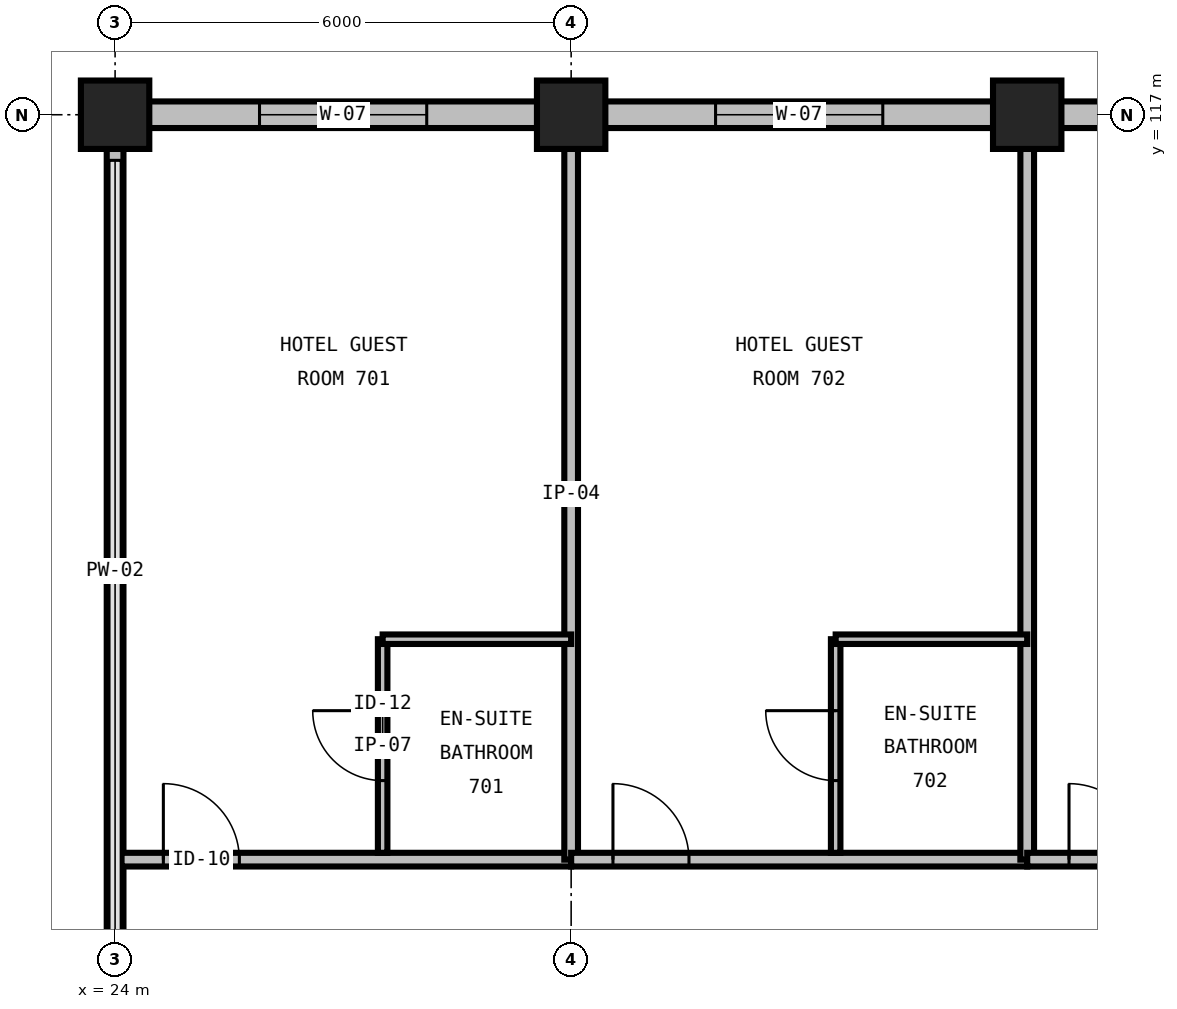
"""IFC4 building model, lengths in metres.
Left out: names, types, materials, properties, quantities, classifications, styles, units other than length and angle.
Written with IfcOpenShell. Run it as: python <this file> out.ifc"""

import sys

from ifc_helpers import new_model, si_unit, direction, frame, frame_2d, origin, origin_2d, place, context, subcontext, project, spatial, rectangle, extrude, element, fill, save


model = new_model("IFC4")
c1 = context("Model", 3, precision=1e-05, world=origin(), true_north=direction((0.0, 1.0)))
c2 = subcontext(c1, "Body", "Model", "MODEL_VIEW")
j1 = project(units=[si_unit("LENGTHUNIT", "METRE"), si_unit("PLANEANGLEUNIT", "RADIAN")], contexts=[c1])
p1 = place(None, origin())
s1 = spatial("IfcSite", under=j1, at=p1, CompositionType="ELEMENT")
p2 = place(p1, origin())
s2 = spatial("IfcBuilding", under=s1, at=p2, CompositionType="ELEMENT")
p3 = place(p2, frame((0.0, 0.0, 34.8)))
s3 = spatial("IfcBuildingStorey", under=s2, at=p3, CompositionType="ELEMENT", Elevation=34.8)
for number, where, z_axis, x_axis in (
    (1, (24.0, 117.0, 0.0), (0.0, 0.0, 1.0), (1.0, 0.0, 0.0)),
    (2, (30.0, 117.0, 0.0), (0.0, 0.0, 1.0), (1.0, 0.0, 0.0)),
    (3, (36.0, 117.0, 0.0), (0.0, 0.0, 1.0), (1.0, 0.0, 0.0)),
):
    element("IfcColumn", number, at=place(p3, frame(where, z_axis=z_axis, x_axis=x_axis)), inside=s3, PredefinedType="COLUMN", context=c2, shape_type="SweptSolid", body=[
        extrude(rectangle(XDim=0.9, YDim=0.9, at=origin_2d()), origin(), (0.0, 0.0, 1.0), 3.6),
    ])
p4 = place(p3, frame((30.0, 117.0, 0.0), z_axis=(0.0, 0.0, 1.0), x_axis=(-1.0, 0.0, 0.0)))
e4 = element("IfcWall", 4, at=p4, inside=s3, PredefinedType="STANDARD", context=c2, shape_type="SweptSolid", body=[
    extrude(rectangle(XDim=6.0, YDim=0.35, at=frame_2d((3.0, 0.0))), origin(), (0.0, 0.0, 1.0), 2.486),
])
p5 = place(p4, frame((1.9, 0.0, 0.75)))
e5 = element("IfcOpeningElement", 5, at=p5, cuts=e4, PredefinedType="OPENING", context=c2, shape_type="SweptSolid", body=[
    extrude(rectangle(XDim=2.2, YDim=1.6, at=frame_2d((1.1, 0.8))), frame((0.0, 0.19, 0.0), z_axis=(0.0, -1.0, 0.0), x_axis=(1.0, 0.0, 0.0)), (0.0, 0.0, 1.0), 0.38),
])
p6 = place(p3, frame((36.0, 117.0, 0.0), z_axis=(0.0, 0.0, 1.0), x_axis=(-1.0, 0.0, 0.0)))
e6 = element("IfcWall", 6, at=p6, inside=s3, PredefinedType="STANDARD", context=c2, shape_type="SweptSolid", body=[
    extrude(rectangle(XDim=6.0, YDim=0.35, at=frame_2d((3.0, 0.0))), origin(), (0.0, 0.0, 1.0), 2.486),
])
p7 = place(p6, frame((1.9, 0.0, 0.75)))
e7 = element("IfcOpeningElement", 7, at=p7, cuts=e6, PredefinedType="OPENING", context=c2, shape_type="SweptSolid", body=[
    extrude(rectangle(XDim=2.2, YDim=1.6, at=frame_2d((1.1, 0.8))), frame((0.0, 0.19, 0.0), z_axis=(0.0, -1.0, 0.0), x_axis=(1.0, 0.0, 0.0)), (0.0, 0.0, 1.0), 0.38),
])
p8 = place(p3, frame((42.0, 117.0, 0.0), z_axis=(0.0, 0.0, 1.0), x_axis=(-1.0, 0.0, 0.0)))
e8 = element("IfcWall", 8, at=p8, inside=s3, PredefinedType="STANDARD", context=c2, shape_type="SweptSolid", body=[
    extrude(rectangle(XDim=6.0, YDim=0.35, at=frame_2d((3.0, 0.0))), origin(), (0.0, 0.0, 1.0), 2.486),
])
p9 = place(p8, frame((1.9, 0.0, 0.75)))
e9 = element("IfcOpeningElement", 9, at=p9, cuts=e8, PredefinedType="OPENING", context=c2, shape_type="SweptSolid", body=[
    extrude(rectangle(XDim=2.2, YDim=1.6, at=frame_2d((1.1, 0.8))), frame((0.0, 0.19, 0.0), z_axis=(0.0, -1.0, 0.0), x_axis=(1.0, 0.0, 0.0)), (0.0, 0.0, 1.0), 0.38),
])
p10 = place(p3, frame((24.0, 117.0, 0.0), z_axis=(0.0, 0.0, 1.0), x_axis=(0.0, -1.0, 0.0)))
e10 = element("IfcWall", 10, at=p10, inside=s3, PredefinedType="PARAPET", context=c2, shape_type="SweptSolid", body=[
    extrude(rectangle(XDim=12.0, YDim=0.22, at=frame_2d((6.0, 0.0))), origin(), (0.0, 0.0, 1.0), 0.2),
])
p11 = place(p3, frame((24.085, 107.2, 0.0), z_axis=(0.0, 0.0, 1.0), x_axis=(1.0, 0.0, 0.0)))
e11 = element("IfcWall", 11, at=p11, inside=s3, PredefinedType="PARTITIONING", context=c2, shape_type="SweptSolid", body=[
    extrude(rectangle(XDim=5.915, YDim=0.18, at=frame_2d((2.957, 0.0))), origin(), (0.0, 0.0, 1.0), 3.29),
])
p12 = place(p11, frame((0.55, 0.0, 0.0)))
e12 = element("IfcOpeningElement", 12, at=p12, cuts=e11, PredefinedType="OPENING", context=c2, shape_type="SweptSolid", body=[
    extrude(rectangle(XDim=1.0, YDim=2.15, at=frame_2d((0.5, 1.075))), frame((0.0, 0.105, 0.0), z_axis=(0.0, -1.0, 0.0), x_axis=(1.0, 0.0, 0.0)), (0.0, 0.0, 1.0), 0.21),
])
p13 = place(p3, frame((30.0, 107.2, 0.0), z_axis=(0.0, 0.0, 1.0), x_axis=(0.0, 1.0, 0.0)))
e13 = element("IfcWall", 13, at=p13, inside=s3, PredefinedType="PARTITIONING", context=c2, shape_type="SweptSolid", body=[
    extrude(rectangle(XDim=9.625, YDim=0.18, at=frame_2d((4.812, 0.0))), origin(), (0.0, 0.0, 1.0), 2.59),
])
p14 = place(p3, frame((27.52, 107.29, 0.0), z_axis=(0.0, 0.0, 1.0), x_axis=(0.0, 1.0, 0.0)))
e14 = element("IfcWall", 14, at=p14, inside=s3, PredefinedType="PARTITIONING", context=c2, shape_type="SweptSolid", body=[
    extrude(rectangle(XDim=2.81, YDim=0.125, at=frame_2d((1.405, 0.0))), origin(), (0.0, 0.0, 1.0), 3.29),
])
p15 = place(p14, frame((0.95, 0.0, 0.0)))
e15 = element("IfcOpeningElement", 15, at=p15, cuts=e14, PredefinedType="OPENING", context=c2, shape_type="SweptSolid", body=[
    extrude(rectangle(XDim=0.92, YDim=2.1, at=frame_2d((0.46, 1.05))), frame((0.0, 0.077, 0.0), z_axis=(0.0, -1.0, 0.0), x_axis=(1.0, 0.0, 0.0)), (0.0, 0.0, 1.0), 0.155),
])
p16 = place(p3, frame((27.52, 110.1, 0.0), z_axis=(0.0, 0.0, 1.0), x_axis=(1.0, 0.0, 0.0)))
e16 = element("IfcWall", 16, at=p16, inside=s3, PredefinedType="PARTITIONING", context=c2, shape_type="SweptSolid", body=[
    extrude(rectangle(XDim=2.48, YDim=0.125, at=frame_2d((1.24, 0.0))), origin(), (0.0, 0.0, 1.0), 3.29),
])
p17 = place(p3, frame((30.0, 107.2, 0.0), z_axis=(0.0, 0.0, 1.0), x_axis=(1.0, 0.0, 0.0)))
e17 = element("IfcWall", 17, at=p17, inside=s3, PredefinedType="PARTITIONING", context=c2, shape_type="SweptSolid", body=[
    extrude(rectangle(XDim=6.0, YDim=0.18, at=frame_2d((3.0, 0.0))), origin(), (0.0, 0.0, 1.0), 3.29),
])
p18 = place(p17, frame((0.55, 0.0, 0.0)))
e18 = element("IfcOpeningElement", 18, at=p18, cuts=e17, PredefinedType="OPENING", context=c2, shape_type="SweptSolid", body=[
    extrude(rectangle(XDim=1.0, YDim=2.15, at=frame_2d((0.5, 1.075))), frame((0.0, 0.105, 0.0), z_axis=(0.0, -1.0, 0.0), x_axis=(1.0, 0.0, 0.0)), (0.0, 0.0, 1.0), 0.21),
])
p19 = place(p3, frame((36.0, 107.2, 0.0), z_axis=(0.0, 0.0, 1.0), x_axis=(0.0, 1.0, 0.0)))
e19 = element("IfcWall", 19, at=p19, inside=s3, PredefinedType="PARTITIONING", context=c2, shape_type="SweptSolid", body=[
    extrude(rectangle(XDim=9.625, YDim=0.18, at=frame_2d((4.812, 0.0))), origin(), (0.0, 0.0, 1.0), 2.59),
])
p20 = place(p3, frame((33.48, 107.29, 0.0), z_axis=(0.0, 0.0, 1.0), x_axis=(0.0, 1.0, 0.0)))
e20 = element("IfcWall", 20, at=p20, inside=s3, PredefinedType="PARTITIONING", context=c2, shape_type="SweptSolid", body=[
    extrude(rectangle(XDim=2.81, YDim=0.125, at=frame_2d((1.405, 0.0))), origin(), (0.0, 0.0, 1.0), 3.29),
])
p21 = place(p20, frame((0.95, 0.0, 0.0)))
e21 = element("IfcOpeningElement", 21, at=p21, cuts=e20, PredefinedType="OPENING", context=c2, shape_type="SweptSolid", body=[
    extrude(rectangle(XDim=0.92, YDim=2.1, at=frame_2d((0.46, 1.05))), frame((0.0, 0.077, 0.0), z_axis=(0.0, -1.0, 0.0), x_axis=(1.0, 0.0, 0.0)), (0.0, 0.0, 1.0), 0.155),
])
p22 = place(p3, frame((33.48, 110.1, 0.0), z_axis=(0.0, 0.0, 1.0), x_axis=(1.0, 0.0, 0.0)))
e22 = element("IfcWall", 22, at=p22, inside=s3, PredefinedType="PARTITIONING", context=c2, shape_type="SweptSolid", body=[
    extrude(rectangle(XDim=2.52, YDim=0.125, at=frame_2d((1.26, 0.0))), origin(), (0.0, 0.0, 1.0), 3.29),
])
p23 = place(p3, frame((36.0, 107.2, 0.0), z_axis=(0.0, 0.0, 1.0), x_axis=(1.0, 0.0, 0.0)))
e23 = element("IfcWall", 23, at=p23, inside=s3, PredefinedType="PARTITIONING", context=c2, shape_type="SweptSolid", body=[
    extrude(rectangle(XDim=6.0, YDim=0.18, at=frame_2d((3.0, 0.0))), origin(), (0.0, 0.0, 1.0), 3.29),
])
p24 = place(p23, frame((0.55, 0.0, 0.0)))
e24 = element("IfcOpeningElement", 24, at=p24, cuts=e23, PredefinedType="OPENING", context=c2, shape_type="SweptSolid", body=[
    extrude(rectangle(XDim=1.0, YDim=2.15, at=frame_2d((0.5, 1.075))), frame((0.0, 0.105, 0.0), z_axis=(0.0, -1.0, 0.0), x_axis=(1.0, 0.0, 0.0)), (0.0, 0.0, 1.0), 0.21),
])
p25 = place(p5, origin())
e25 = element("IfcWindow", 25, at=p25, inside=s3, PartitioningType="DOUBLE_PANEL_VERTICAL", PredefinedType="WINDOW", context=c2, shape_type="SweptSolid", body=[
    extrude(rectangle(XDim=2.2, YDim=1.6, at=frame_2d((1.1, 0.8))), frame((0.0, 0.03, 0.0), z_axis=(0.0, -1.0, 0.0), x_axis=(1.0, 0.0, 0.0)), (0.0, 0.0, 1.0), 0.06),
])
fill(e5, e25)
p26 = place(p7, origin())
e26 = element("IfcWindow", 26, at=p26, inside=s3, PartitioningType="DOUBLE_PANEL_VERTICAL", PredefinedType="WINDOW", context=c2, shape_type="SweptSolid", body=[
    extrude(rectangle(XDim=2.2, YDim=1.6, at=frame_2d((1.1, 0.8))), frame((0.0, 0.03, 0.0), z_axis=(0.0, -1.0, 0.0), x_axis=(1.0, 0.0, 0.0)), (0.0, 0.0, 1.0), 0.06),
])
fill(e7, e26)
p27 = place(p12, origin())
e27 = element("IfcDoor", 27, at=p27, inside=s3, OperationType="SINGLE_SWING_LEFT", PredefinedType="DOOR", context=c2, shape_type="SweptSolid", body=[
    extrude(rectangle(XDim=1.0, YDim=2.15, at=frame_2d((0.5, 1.075))), frame((0.0, 0.025, 0.0), z_axis=(0.0, -1.0, 0.0), x_axis=(1.0, 0.0, 0.0)), (0.0, 0.0, 1.0), 0.05),
])
fill(e12, e27)
p28 = place(p15, origin())
e28 = element("IfcDoor", 28, at=p28, inside=s3, OperationType="SINGLE_SWING_RIGHT", PredefinedType="DOOR", context=c2, shape_type="SweptSolid", body=[
    extrude(rectangle(XDim=0.92, YDim=2.1, at=frame_2d((0.46, 1.05))), frame((0.0, 0.025, 0.0), z_axis=(0.0, -1.0, 0.0), x_axis=(1.0, 0.0, 0.0)), (0.0, 0.0, 1.0), 0.05),
])
fill(e15, e28)
p29 = place(p18, origin())
e29 = element("IfcDoor", 29, at=p29, inside=s3, OperationType="SINGLE_SWING_LEFT", PredefinedType="DOOR", context=c2, shape_type="SweptSolid", body=[
    extrude(rectangle(XDim=1.0, YDim=2.15, at=frame_2d((0.5, 1.075))), frame((0.0, 0.025, 0.0), z_axis=(0.0, -1.0, 0.0), x_axis=(1.0, 0.0, 0.0)), (0.0, 0.0, 1.0), 0.05),
])
fill(e18, e29)
p30 = place(p21, origin())
e30 = element("IfcDoor", 30, at=p30, inside=s3, OperationType="SINGLE_SWING_RIGHT", PredefinedType="DOOR", context=c2, shape_type="SweptSolid", body=[
    extrude(rectangle(XDim=0.92, YDim=2.1, at=frame_2d((0.46, 1.05))), frame((0.0, 0.025, 0.0), z_axis=(0.0, -1.0, 0.0), x_axis=(1.0, 0.0, 0.0)), (0.0, 0.0, 1.0), 0.05),
])
fill(e21, e30)
p31 = place(p24, origin())
e31 = element("IfcDoor", 31, at=p31, inside=s3, OperationType="SINGLE_SWING_LEFT", PredefinedType="DOOR", context=c2, shape_type="SweptSolid", body=[
    extrude(rectangle(XDim=1.0, YDim=2.15, at=frame_2d((0.5, 1.075))), frame((0.0, 0.025, 0.0), z_axis=(0.0, -1.0, 0.0), x_axis=(1.0, 0.0, 0.0)), (0.0, 0.0, 1.0), 0.05),
])
fill(e24, e31)
save(model, sys.argv[1])
